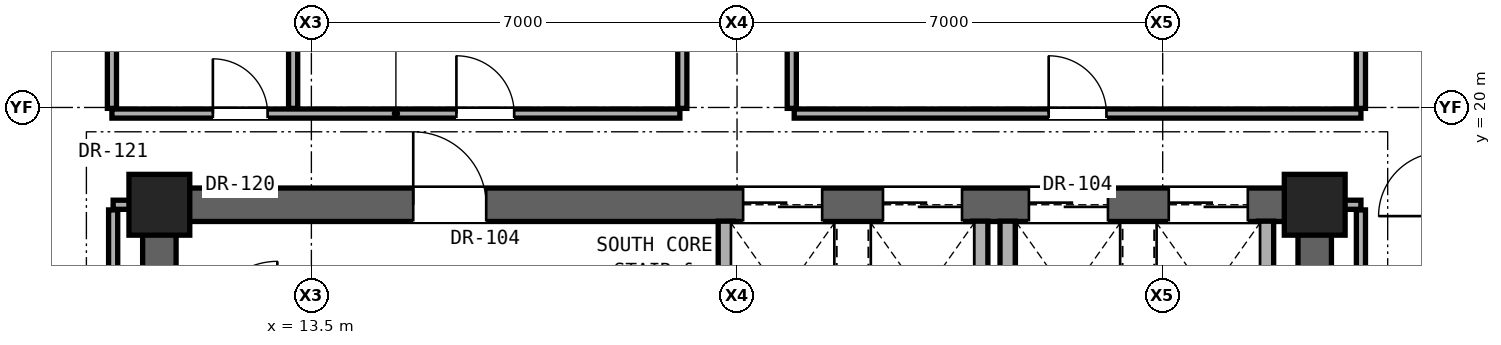
"""IFC4 building model, lengths in metres.
Left out: names, types, materials, properties, quantities, classifications, styles, units other than length and angle.
Written with IfcOpenShell. Run it as: python <this file> out.ifc"""

import sys

from ifc_helpers import new_model, si_unit, direction, frame, frame_2d, origin, origin_2d, place, context, subcontext, project, spatial, rectangle, extrude, element, fill, save


model = new_model("IFC4")
c1 = context("Model", 3, precision=1e-05, world=origin(), true_north=direction((0.0, 1.0)))
c2 = subcontext(c1, "Body", "Model", "MODEL_VIEW")
j1 = project(units=[si_unit("LENGTHUNIT", "METRE"), si_unit("PLANEANGLEUNIT", "RADIAN")], contexts=[c1])
p1 = place(None, origin())
s1 = spatial("IfcSite", under=j1, at=p1, CompositionType="ELEMENT")
p2 = place(p1, origin())
s2 = spatial("IfcBuilding", under=s1, at=p2, CompositionType="ELEMENT")
p3 = place(p2, frame((0.0, 0.0, 157.65)))
s3 = spatial("IfcBuildingStorey", under=s2, at=p3, CompositionType="ELEMENT", Elevation=157.65)
for number, where, z_axis, x_axis in (
    (1, (11.0, 18.4, 0.0), (0.0, 0.0, 1.0), (1.0, 0.0, 0.0)),
    (2, (30.0, 18.4, 0.0), (0.0, 0.0, 1.0), (1.0, 0.0, 0.0)),
):
    element("IfcColumn", number, at=place(p3, frame(where, z_axis=z_axis, x_axis=x_axis)), inside=s3, PredefinedType="COLUMN", context=c2, shape_type="SweptSolid", body=[
        extrude(rectangle(XDim=1.0, YDim=1.0, at=origin_2d()), origin(), (0.0, 0.0, 1.0), 3.25),
    ])
for number, where, z_axis, x_axis in (
    (3, (11.0, 12.4, 0.0), (0.0, 0.0, 1.0), (0.0, 1.0, 0.0)),
    (4, (30.0, 12.4, 0.0), (0.0, 0.0, 1.0), (0.0, 1.0, 0.0)),
):
    element("IfcWall", number, at=place(p3, frame(where, z_axis=z_axis, x_axis=x_axis)), inside=s3, PredefinedType="SHEAR", context=c2, shape_type="SweptSolid", body=[
        extrude(rectangle(XDim=6.0, YDim=0.55, at=frame_2d((3.0, 0.0))), origin(), (0.0, 0.0, 1.0), 3.05),
    ])
p4 = place(p3, frame((11.0, 18.4, 0.0), z_axis=(0.0, 0.0, 1.0), x_axis=(1.0, 0.0, 0.0)))
e5 = element("IfcWall", 5, at=p4, inside=s3, PredefinedType="SHEAR", context=c2, shape_type="SweptSolid", body=[
    extrude(rectangle(XDim=19.0, YDim=0.55, at=frame_2d((9.5, 0.0))), origin(), (0.0, 0.0, 1.0), 3.05),
])
p5 = place(p4, frame((4.175, 0.0, 0.0)))
e6 = element("IfcOpeningElement", 6, at=p5, cuts=e5, PredefinedType="OPENING", context=c2, shape_type="SweptSolid", body=[
    extrude(rectangle(XDim=1.2, YDim=2.25, at=frame_2d((0.6, 1.125))), frame((0.0, 0.285, 0.0), z_axis=(0.0, -1.0, 0.0), x_axis=(1.0, 0.0, 0.0)), (0.0, 0.0, 1.0), 0.57),
])
p6 = place(p4, frame((9.6, 0.0, 0.0)))
e7 = element("IfcOpeningElement", 7, at=p6, cuts=e5, PredefinedType="OPENING", context=c2, shape_type="SweptSolid", body=[
    extrude(rectangle(XDim=1.3, YDim=2.3, at=frame_2d((0.65, 1.15))), frame((0.0, 0.285, 0.0), z_axis=(0.0, -1.0, 0.0), x_axis=(1.0, 0.0, 0.0)), (0.0, 0.0, 1.0), 0.57),
])
p7 = place(p4, frame((11.9, 0.0, 0.0)))
e8 = element("IfcOpeningElement", 8, at=p7, cuts=e5, PredefinedType="OPENING", context=c2, shape_type="SweptSolid", body=[
    extrude(rectangle(XDim=1.3, YDim=2.3, at=frame_2d((0.65, 1.15))), frame((0.0, 0.285, 0.0), z_axis=(0.0, -1.0, 0.0), x_axis=(1.0, 0.0, 0.0)), (0.0, 0.0, 1.0), 0.57),
])
p8 = place(p4, frame((14.3, 0.0, 0.0)))
e9 = element("IfcOpeningElement", 9, at=p8, cuts=e5, PredefinedType="OPENING", context=c2, shape_type="SweptSolid", body=[
    extrude(rectangle(XDim=1.3, YDim=2.3, at=frame_2d((0.65, 1.15))), frame((0.0, 0.285, 0.0), z_axis=(0.0, -1.0, 0.0), x_axis=(1.0, 0.0, 0.0)), (0.0, 0.0, 1.0), 0.57),
])
p9 = place(p4, frame((16.6, 0.0, 0.0)))
e10 = element("IfcOpeningElement", 10, at=p9, cuts=e5, PredefinedType="OPENING", context=c2, shape_type="SweptSolid", body=[
    extrude(rectangle(XDim=1.3, YDim=2.3, at=frame_2d((0.65, 1.15))), frame((0.0, 0.285, 0.0), z_axis=(0.0, -1.0, 0.0), x_axis=(1.0, 0.0, 0.0)), (0.0, 0.0, 1.0), 0.57),
])
for number, where, z_axis, x_axis in (
    (11, (10.24, 18.4, 0.0), (0.0, 0.0, 1.0), (1.0, 0.0, 0.0)),
    (12, (30.27, 18.4, 0.0), (0.0, 0.0, 1.0), (1.0, 0.0, 0.0)),
):
    element("IfcWall", number, at=place(p3, frame(where, z_axis=z_axis, x_axis=x_axis)), inside=s3, PredefinedType="PARTITIONING", context=c2, shape_type="SweptSolid", body=[
        extrude(rectangle(XDim=0.49, YDim=0.15, at=frame_2d((0.245, 0.0))), origin(), (0.0, 0.0, 1.0), 2.442),
    ])
p10 = place(p3, frame((10.22, 19.9, 0.0), z_axis=(0.0, 0.0, 1.0), x_axis=(1.0, 0.0, 0.0)))
e13 = element("IfcWall", 13, at=p10, inside=s3, PredefinedType="PARTITIONING", context=c2, shape_type="SweptSolid", body=[
    extrude(rectangle(XDim=9.34, YDim=0.15, at=frame_2d((4.67, 0.0))), origin(), (0.0, 0.0, 1.0), 2.186),
])
p11 = place(p10, frame((1.66, 0.0, 0.0)))
e14 = element("IfcOpeningElement", 14, at=p11, cuts=e13, PredefinedType="OPENING", context=c2, shape_type="SweptSolid", body=[
    extrude(rectangle(XDim=0.9, YDim=2.1, at=frame_2d((0.45, 1.05))), frame((0.0, 0.085, 0.0), z_axis=(0.0, -1.0, 0.0), x_axis=(1.0, 0.0, 0.0)), (0.0, 0.0, 1.0), 0.17),
])
p12 = place(p10, frame((5.665, 0.0, 0.0)))
e15 = element("IfcOpeningElement", 15, at=p12, cuts=e13, PredefinedType="OPENING", context=c2, shape_type="SweptSolid", body=[
    extrude(rectangle(XDim=0.95, YDim=2.15, at=frame_2d((0.475, 1.075))), frame((0.0, 0.085, 0.0), z_axis=(0.0, -1.0, 0.0), x_axis=(1.0, 0.0, 0.0)), (0.0, 0.0, 1.0), 0.17),
])
p13 = place(p3, frame((21.44, 19.9, 0.0), z_axis=(0.0, 0.0, 1.0), x_axis=(1.0, 0.0, 0.0)))
e16 = element("IfcWall", 16, at=p13, inside=s3, PredefinedType="PARTITIONING", context=c2, shape_type="SweptSolid", body=[
    extrude(rectangle(XDim=9.32, YDim=0.15, at=frame_2d((4.66, 0.0))), origin(), (0.0, 0.0, 1.0), 2.186),
])
p14 = place(p13, frame((4.185, 0.0, 0.0)))
e17 = element("IfcOpeningElement", 17, at=p14, cuts=e16, PredefinedType="OPENING", context=c2, shape_type="SweptSolid", body=[
    extrude(rectangle(XDim=0.95, YDim=2.15, at=frame_2d((0.475, 1.075))), frame((0.0, 0.085, 0.0), z_axis=(0.0, -1.0, 0.0), x_axis=(1.0, 0.0, 0.0)), (0.0, 0.0, 1.0), 0.17),
])
p15 = place(p3, frame((10.22, 19.985, 0.0), z_axis=(0.0, 0.0, 1.0), x_axis=(0.0, 1.0, 0.0)))
e18 = element("IfcWall", 18, at=p15, inside=s3, PredefinedType="PARTITIONING", context=c2, shape_type="SweptSolid", body=[
    extrude(rectangle(XDim=2.78, YDim=0.15, at=frame_2d((1.39, 0.0))), origin(), (0.0, 0.0, 1.0), 3.05),
])
p16 = place(p3, frame((10.24, 12.335, 0.0), z_axis=(0.0, 0.0, 1.0), x_axis=(0.0, 1.0, 0.0)))
e19 = element("IfcWall", 19, at=p16, inside=s3, PredefinedType="PARTITIONING", context=c2, shape_type="SweptSolid", body=[
    extrude(rectangle(XDim=5.98, YDim=0.15, at=frame_2d((2.99, 0.0))), origin(), (0.0, 0.0, 1.0), 2.442),
])
p17 = place(p3, frame((13.2, 19.985, 0.0), z_axis=(0.0, 0.0, 1.0), x_axis=(0.0, 1.0, 0.0)))
e20 = element("IfcWall", 20, at=p17, inside=s3, PredefinedType="PARTITIONING", context=c2, shape_type="SweptSolid", body=[
    extrude(rectangle(XDim=2.78, YDim=0.15, at=frame_2d((1.39, 0.0))), origin(), (0.0, 0.0, 1.0), 3.05),
])
p18 = place(p3, frame((19.6, 19.985, 0.0), z_axis=(0.0, 0.0, 1.0), x_axis=(0.0, 1.0, 0.0)))
e21 = element("IfcWall", 21, at=p18, inside=s3, PredefinedType="PARTITIONING", context=c2, shape_type="SweptSolid", body=[
    extrude(rectangle(XDim=5.53, YDim=0.15, at=frame_2d((2.765, 0.0))), origin(), (0.0, 0.0, 1.0), 2.186),
])
p19 = place(p3, frame((20.315, 16.555, 0.0), z_axis=(0.0, 0.0, 1.0), x_axis=(0.0, 1.0, 0.0)))
e22 = element("IfcWall", 22, at=p19, inside=s3, PredefinedType="SOLIDWALL", context=c2, shape_type="SweptSolid", body=[
    extrude(rectangle(XDim=1.575, YDim=0.25, at=frame_2d((0.788, 0.0))), origin(), (0.0, 0.0, 1.0), 3.05),
])
p20 = place(p3, frame((21.4, 19.985, 0.0), z_axis=(0.0, 0.0, 1.0), x_axis=(0.0, 1.0, 0.0)))
e23 = element("IfcWall", 23, at=p20, inside=s3, PredefinedType="PARTITIONING", context=c2, shape_type="SweptSolid", body=[
    extrude(rectangle(XDim=5.53, YDim=0.15, at=frame_2d((2.765, 0.0))), origin(), (0.0, 0.0, 1.0), 2.186),
])
for number, where, z_axis, x_axis in (
    (24, (24.5, 15.785, 0.0), (0.0, 0.0, 1.0), (0.0, 1.0, 0.0)),
    (25, (24.95, 15.785, 0.0), (0.0, 0.0, 1.0), (0.0, 1.0, 0.0)),
    (26, (29.2, 15.785, 0.0), (0.0, 0.0, 1.0), (0.0, 1.0, 0.0)),
):
    element("IfcWall", number, at=place(p3, frame(where, z_axis=z_axis, x_axis=x_axis)), inside=s3, PredefinedType="SOLIDWALL", context=c2, shape_type="SweptSolid", body=[
        extrude(rectangle(XDim=2.345, YDim=0.25, at=frame_2d((1.172, 0.0))), origin(), (0.0, 0.0, 1.0), 3.05),
    ])
p21 = place(p3, frame((30.76, 12.335, 0.0), z_axis=(0.0, 0.0, 1.0), x_axis=(0.0, 1.0, 0.0)))
e27 = element("IfcWall", 27, at=p21, inside=s3, PredefinedType="PARTITIONING", context=c2, shape_type="SweptSolid", body=[
    extrude(rectangle(XDim=5.98, YDim=0.15, at=frame_2d((2.99, 0.0))), origin(), (0.0, 0.0, 1.0), 2.442),
])
p22 = place(p3, frame((30.76, 19.985, 0.0), z_axis=(0.0, 0.0, 1.0), x_axis=(0.0, 1.0, 0.0)))
e28 = element("IfcWall", 28, at=p22, inside=s3, PredefinedType="PARTITIONING", context=c2, shape_type="SweptSolid", body=[
    extrude(rectangle(XDim=5.53, YDim=0.15, at=frame_2d((2.765, 0.0))), origin(), (0.0, 0.0, 1.0), 2.346),
])
p23 = place(p5, origin())
e29 = element("IfcDoor", 29, at=p23, inside=s3, OperationType="SINGLE_SWING_LEFT", PredefinedType="DOOR", context=c2, shape_type="SweptSolid", body=[
    extrude(rectangle(XDim=1.2, YDim=2.25, at=frame_2d((0.6, 1.125))), frame((0.0, 0.025, 0.0), z_axis=(0.0, -1.0, 0.0), x_axis=(1.0, 0.0, 0.0)), (0.0, 0.0, 1.0), 0.05),
])
fill(e6, e29)
p24 = place(p11, origin())
e30 = element("IfcDoor", 30, at=p24, inside=s3, OperationType="SINGLE_SWING_LEFT", PredefinedType="DOOR", context=c2, shape_type="SweptSolid", body=[
    extrude(rectangle(XDim=0.9, YDim=2.1, at=frame_2d((0.45, 1.05))), frame((0.0, 0.025, 0.0), z_axis=(0.0, -1.0, 0.0), x_axis=(1.0, 0.0, 0.0)), (0.0, 0.0, 1.0), 0.05),
])
fill(e14, e30)
p25 = place(p12, origin())
e31 = element("IfcDoor", 31, at=p25, inside=s3, OperationType="SINGLE_SWING_LEFT", PredefinedType="DOOR", context=c2, shape_type="SweptSolid", body=[
    extrude(rectangle(XDim=0.95, YDim=2.15, at=frame_2d((0.475, 1.075))), frame((0.0, 0.025, 0.0), z_axis=(0.0, -1.0, 0.0), x_axis=(1.0, 0.0, 0.0)), (0.0, 0.0, 1.0), 0.05),
])
fill(e15, e31)
p26 = place(p14, origin())
e32 = element("IfcDoor", 32, at=p26, inside=s3, OperationType="SINGLE_SWING_LEFT", PredefinedType="DOOR", context=c2, shape_type="SweptSolid", body=[
    extrude(rectangle(XDim=0.95, YDim=2.15, at=frame_2d((0.475, 1.075))), frame((0.0, 0.025, 0.0), z_axis=(0.0, -1.0, 0.0), x_axis=(1.0, 0.0, 0.0)), (0.0, 0.0, 1.0), 0.05),
])
fill(e17, e32)
p27 = place(p6, origin())
e33 = element("IfcDoor", 33, at=p27, inside=s3, OperationType="DOUBLE_DOOR_SLIDING", PredefinedType="DOOR", context=c2, shape_type="SweptSolid", body=[
    extrude(rectangle(XDim=1.3, YDim=2.3, at=frame_2d((0.65, 1.15))), frame((0.0, 0.025, 0.0), z_axis=(0.0, -1.0, 0.0), x_axis=(1.0, 0.0, 0.0)), (0.0, 0.0, 1.0), 0.05),
])
fill(e7, e33)
p28 = place(p7, origin())
e34 = element("IfcDoor", 34, at=p28, inside=s3, OperationType="DOUBLE_DOOR_SLIDING", PredefinedType="DOOR", context=c2, shape_type="SweptSolid", body=[
    extrude(rectangle(XDim=1.3, YDim=2.3, at=frame_2d((0.65, 1.15))), frame((0.0, 0.025, 0.0), z_axis=(0.0, -1.0, 0.0), x_axis=(1.0, 0.0, 0.0)), (0.0, 0.0, 1.0), 0.05),
])
fill(e8, e34)
p29 = place(p8, origin())
e35 = element("IfcDoor", 35, at=p29, inside=s3, OperationType="DOUBLE_DOOR_SLIDING", PredefinedType="DOOR", context=c2, shape_type="SweptSolid", body=[
    extrude(rectangle(XDim=1.3, YDim=2.3, at=frame_2d((0.65, 1.15))), frame((0.0, 0.025, 0.0), z_axis=(0.0, -1.0, 0.0), x_axis=(1.0, 0.0, 0.0)), (0.0, 0.0, 1.0), 0.05),
])
fill(e9, e35)
p30 = place(p9, origin())
e36 = element("IfcDoor", 36, at=p30, inside=s3, OperationType="DOUBLE_DOOR_SLIDING", PredefinedType="DOOR", context=c2, shape_type="SweptSolid", body=[
    extrude(rectangle(XDim=1.3, YDim=2.3, at=frame_2d((0.65, 1.15))), frame((0.0, 0.025, 0.0), z_axis=(0.0, -1.0, 0.0), x_axis=(1.0, 0.0, 0.0)), (0.0, 0.0, 1.0), 0.05),
])
fill(e10, e36)
save(model, sys.argv[1])
